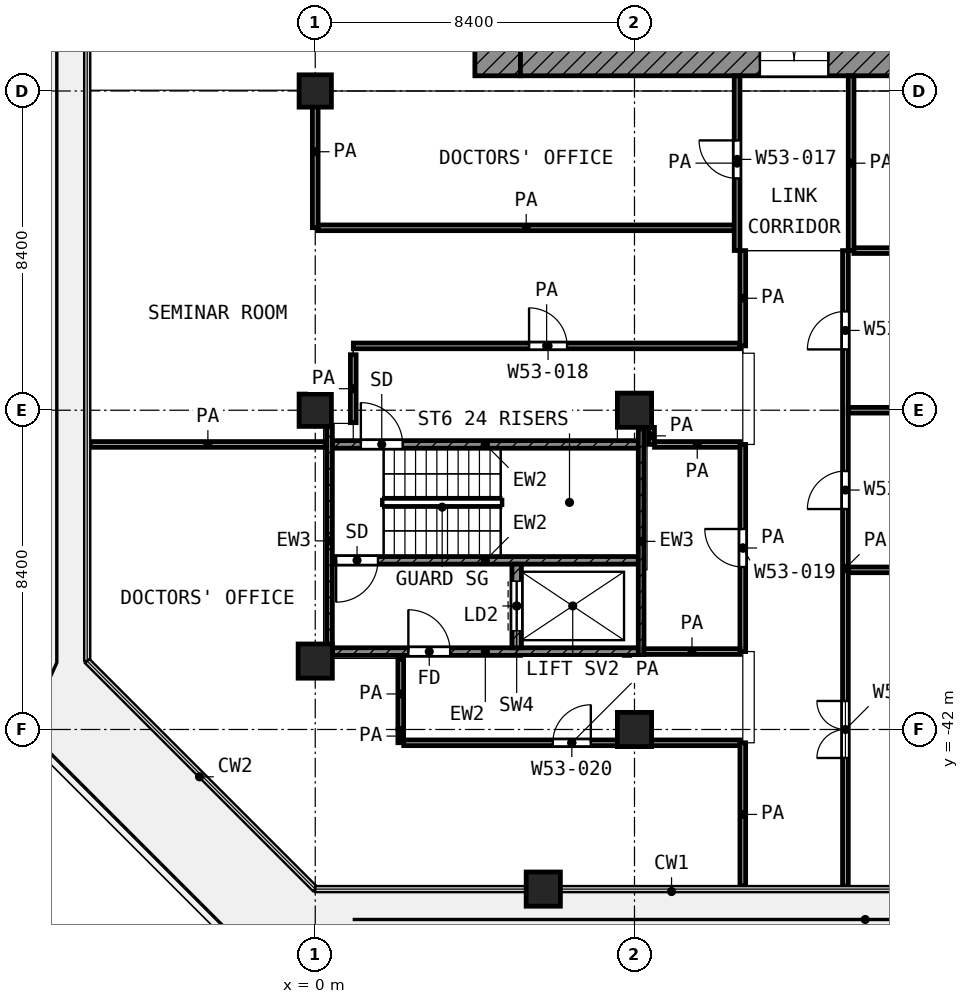
"""IFC4 building model, lengths in metres.
Left out: names, types, materials, properties, quantities, classifications, styles, units other than length and angle.
Written with IfcOpenShell. Run it as: python <this file> out.ifc"""

import sys

from ifc_helpers import new_model, si_unit, direction, frame, frame_2d, origin, origin_2d, place, context, subcontext, project, spatial, rectangle, extrude, element, fill, save


model = new_model("IFC4")
c1 = context("Model", 3, precision=1e-05, world=origin(), true_north=direction((0.0, 1.0)))
c2 = subcontext(c1, "Body", "Model", "MODEL_VIEW")
j1 = project(units=[si_unit("LENGTHUNIT", "METRE"), si_unit("PLANEANGLEUNIT", "RADIAN")], contexts=[c1])
p1 = place(None, origin())
s1 = spatial("IfcSite", under=j1, at=p1, CompositionType="ELEMENT")
p2 = place(p1, origin())
s2 = spatial("IfcBuilding", under=s1, at=p2, CompositionType="ELEMENT")
p3 = place(p2, frame((0.0, 0.0, 230.6)))
s3 = spatial("IfcBuildingStorey", under=s2, at=p3, CompositionType="ELEMENT", Elevation=230.6)
for number, where, z_axis, x_axis in (
    (1, (0.0, -25.2, 0.0), (0.0, 0.0, 1.0), (1.0, 0.0, 0.0)),
    (2, (0.0, -33.6, 0.0), (0.0, 0.0, 1.0), (1.0, 0.0, 0.0)),
):
    element("IfcColumn", number, at=place(p3, frame(where, z_axis=z_axis, x_axis=x_axis)), inside=s3, PredefinedType="COLUMN", context=c2, shape_type="SweptSolid", body=[
        extrude(rectangle(XDim=0.85, YDim=0.85, at=origin_2d()), origin(), (0.0, 0.0, 1.0), 4.2),
    ])
for number, where, z_axis, x_axis in (
    (3, (8.4, -33.6, 0.0), (0.0, 0.0, 1.0), (1.0, 0.0, 0.0)),
    (4, (0.0, -40.2, 0.0), (0.0, 0.0, 1.0), (1.0, 0.0, 0.0)),
    (5, (8.4, -42.0, 0.0), (0.0, 0.0, 1.0), (1.0, 0.0, 0.0)),
    (6, (6.0, -46.2, 0.0), (0.0, 0.0, 1.0), (1.0, 0.0, 0.0)),
):
    element("IfcColumn", number, at=place(p3, frame(where, z_axis=z_axis, x_axis=x_axis)), inside=s3, PredefinedType="COLUMN", context=c2, shape_type="SweptSolid", body=[
        extrude(rectangle(XDim=0.9, YDim=0.9, at=origin_2d()), origin(), (0.0, 0.0, 1.0), 4.2),
    ])
p4 = place(p3, frame((4.8, -24.8, 0.0), z_axis=(0.0, 0.0, 1.0), x_axis=(0.0, 1.0, 0.0)))
e7 = element("IfcWall", 7, at=p4, inside=s3, PredefinedType="SHEAR", context=c2, shape_type="SweptSolid", body=[
    extrude(rectangle(XDim=19.4, YDim=1.2, at=frame_2d((9.7, 0.0))), origin(), (0.0, 0.0, 1.0), 3.6),
])
p5 = place(p4, frame((11.25, 0.0, 0.0)))
e8 = element("IfcOpeningElement", 8, at=p5, cuts=e7, PredefinedType="OPENING", context=c2, shape_type="SweptSolid", body=[
    extrude(rectangle(XDim=1.1, YDim=2.1, at=frame_2d((0.55, 1.05))), frame((0.0, 0.61, 0.0), z_axis=(0.0, -1.0, 0.0), x_axis=(1.0, 0.0, 0.0)), (0.0, 0.0, 1.0), 1.22),
])
p6 = place(p4, frame((1.95, 0.0, 0.0)))
e9 = element("IfcOpeningElement", 9, at=p6, cuts=e7, PredefinedType="OPENING", context=c2, shape_type="SweptSolid", body=[
    extrude(rectangle(XDim=1.1, YDim=2.1, at=frame_2d((0.55, 1.05))), frame((0.0, 0.61, 0.0), z_axis=(0.0, -1.0, 0.0), x_axis=(1.0, 0.0, 0.0)), (0.0, 0.0, 1.0), 1.22),
])
p7 = place(p3, frame((5.4, -24.4, 0.0), z_axis=(0.0, 0.0, 1.0), x_axis=(1.0, 0.0, 0.0)))
e10 = element("IfcWall", 10, at=p7, inside=s3, PredefinedType="SHEAR", context=c2, shape_type="SweptSolid", body=[
    extrude(rectangle(XDim=18.6, YDim=0.8, at=frame_2d((9.3, 0.0))), origin(), (0.0, 0.0, 1.0), 3.6),
])
p8 = place(p7, frame((6.3, 0.0, 0.0)))
e11 = element("IfcOpeningElement", 11, at=p8, cuts=e10, PredefinedType="OPENING", context=c2, shape_type="SweptSolid", body=[
    extrude(rectangle(XDim=1.8, YDim=2.1, at=frame_2d((0.9, 1.05))), frame((0.0, 0.41, 0.0), z_axis=(0.0, -1.0, 0.0), x_axis=(1.0, 0.0, 0.0)), (0.0, 0.0, 1.0), 0.82),
])
p9 = place(p3, frame((0.375, -40.05, 0.0), z_axis=(0.0, 0.0, 1.0), x_axis=(0.0, 1.0, 0.0)))
e12 = element("IfcWall", 12, at=p9, inside=s3, PredefinedType="SHEAR", context=c2, shape_type="SweptSolid", body=[
    extrude(rectangle(XDim=6.025, YDim=0.15, at=frame_2d((3.013, 0.0))), origin(), (0.0, 0.0, 1.0), 3.6),
])
p10 = place(p3, frame((8.575, -40.05, 0.0), z_axis=(0.0, 0.0, 1.0), x_axis=(0.0, 1.0, 0.0)))
e13 = element("IfcWall", 13, at=p10, inside=s3, PredefinedType="SHEAR", context=c2, shape_type="SweptSolid", body=[
    extrude(rectangle(XDim=6.0, YDim=0.15, at=frame_2d((3.0, 0.0))), origin(), (0.0, 0.0, 1.0), 3.6),
])
p11 = place(p3, frame((0.45, -34.5, 0.0), z_axis=(0.0, 0.0, 1.0), x_axis=(1.0, 0.0, 0.0)))
e14 = element("IfcWall", 14, at=p11, inside=s3, PredefinedType="SHEAR", context=c2, shape_type="SweptSolid", body=[
    extrude(rectangle(XDim=8.05, YDim=0.2, at=frame_2d((4.025, 0.0))), origin(), (0.0, 0.0, 1.0), 3.6),
])
p12 = place(p11, frame((0.75, 0.0, 0.0)))
e15 = element("IfcOpeningElement", 15, at=p12, cuts=e14, PredefinedType="OPENING", context=c2, shape_type="SweptSolid", body=[
    extrude(rectangle(XDim=1.1, YDim=2.1, at=frame_2d((0.55, 1.05))), frame((0.0, 0.11, 0.0), z_axis=(0.0, -1.0, 0.0), x_axis=(1.0, 0.0, 0.0)), (0.0, 0.0, 1.0), 0.22),
])
p13 = place(p3, frame((0.45, -37.55, 0.0), z_axis=(0.0, 0.0, 1.0), x_axis=(1.0, 0.0, 0.0)))
e16 = element("IfcWall", 16, at=p13, inside=s3, PredefinedType="SHEAR", context=c2, shape_type="SweptSolid", body=[
    extrude(rectangle(XDim=8.05, YDim=0.2, at=frame_2d((4.025, 0.0))), origin(), (0.0, 0.0, 1.0), 3.6),
])
p14 = place(p13, frame((0.1, 0.0, 0.0)))
e17 = element("IfcOpeningElement", 17, at=p14, cuts=e16, PredefinedType="OPENING", context=c2, shape_type="SweptSolid", body=[
    extrude(rectangle(XDim=1.1, YDim=2.1, at=frame_2d((0.55, 1.05))), frame((0.0, 0.11, 0.0), z_axis=(0.0, -1.0, 0.0), x_axis=(1.0, 0.0, 0.0)), (0.0, 0.0, 1.0), 0.22),
])
p15 = place(p3, frame((0.45, -39.95, 0.0), z_axis=(0.0, 0.0, 1.0), x_axis=(1.0, 0.0, 0.0)))
e18 = element("IfcWall", 18, at=p15, inside=s3, PredefinedType="SHEAR", context=c2, shape_type="SweptSolid", body=[
    extrude(rectangle(XDim=8.05, YDim=0.2, at=frame_2d((4.025, 0.0))), origin(), (0.0, 0.0, 1.0), 3.6),
])
p16 = place(p15, frame((2.0, 0.0, 0.0)))
e19 = element("IfcOpeningElement", 19, at=p16, cuts=e18, PredefinedType="OPENING", context=c2, shape_type="SweptSolid", body=[
    extrude(rectangle(XDim=1.1, YDim=2.1, at=frame_2d((0.55, 1.05))), frame((0.0, 0.11, 0.0), z_axis=(0.0, -1.0, 0.0), x_axis=(1.0, 0.0, 0.0)), (0.0, 0.0, 1.0), 0.22),
])
p17 = place(p3, frame((5.3, -39.85, 0.0), z_axis=(0.0, 0.0, 1.0), x_axis=(0.0, 1.0, 0.0)))
e20 = element("IfcWall", 20, at=p17, inside=s3, PredefinedType="SHEAR", context=c2, shape_type="SweptSolid", body=[
    extrude(rectangle(XDim=2.2, YDim=0.25, at=frame_2d((1.1, 0.0))), origin(), (0.0, 0.0, 1.0), 3.6),
])
p18 = place(p17, frame((0.45, 0.0, 0.0)))
e21 = element("IfcOpeningElement", 21, at=p18, cuts=e20, PredefinedType="OPENING", context=c2, shape_type="SweptSolid", body=[
    extrude(rectangle(XDim=1.3, YDim=2.1, at=frame_2d((0.65, 1.05))), frame((0.0, 0.135, 0.0), z_axis=(0.0, -1.0, 0.0), x_axis=(1.0, 0.0, 0.0)), (0.0, 0.0, 1.0), 0.27),
])
p19 = place(p3, frame((2.327, -42.35, 0.0), z_axis=(0.0, 0.0, 1.0), x_axis=(1.0, 0.0, 0.0)))
e22 = element("IfcWall", 22, at=p19, inside=s3, PredefinedType="PARTITIONING", context=c2, shape_type="SweptSolid", body=[
    extrude(rectangle(XDim=8.848, YDim=0.15, at=frame_2d((4.424, 0.0))), origin(), (0.0, 0.0, 1.0), 3.6),
])
p20 = place(p19, frame((3.924, 0.0, 0.0)))
e23 = element("IfcOpeningElement", 23, at=p20, cuts=e22, PredefinedType="OPENING", context=c2, shape_type="SweptSolid", body=[
    extrude(rectangle(XDim=1.0, YDim=2.1, at=frame_2d((0.5, 1.05))), frame((0.0, 0.085, 0.0), z_axis=(0.0, -1.0, 0.0), x_axis=(1.0, 0.0, 0.0)), (0.0, 0.0, 1.0), 0.17),
])
p21 = place(p3, frame((8.65, -39.95, 0.0), z_axis=(0.0, 0.0, 1.0), x_axis=(1.0, 0.0, 0.0)))
e24 = element("IfcWall", 24, at=p21, inside=s3, PredefinedType="PARTITIONING", context=c2, shape_type="SweptSolid", body=[
    extrude(rectangle(XDim=2.525, YDim=0.15, at=frame_2d((1.263, 0.0))), origin(), (0.0, 0.0, 1.0), 3.6),
])
p22 = place(p3, frame((14.025, -37.8, 0.0), z_axis=(0.0, 0.0, 1.0), x_axis=(1.0, 0.0, 0.0)))
e25 = element("IfcWall", 25, at=p22, inside=s3, PredefinedType="PARTITIONING", context=c2, shape_type="SweptSolid", body=[
    extrude(rectangle(XDim=11.095, YDim=0.15, at=frame_2d((5.548, 0.0))), origin(), (0.0, 0.0, 1.0), 2.7),
])
p23 = place(p3, frame((-5.92, -34.5, 0.0), z_axis=(0.0, 0.0, 1.0), x_axis=(1.0, 0.0, 0.0)))
e26 = element("IfcWall", 26, at=p23, inside=s3, PredefinedType="PARTITIONING", context=c2, shape_type="SweptSolid", body=[
    extrude(rectangle(XDim=6.19, YDim=0.15, at=frame_2d((3.095, 0.0))), origin(), (0.0, 0.0, 1.0), 3.6),
])
p24 = place(p3, frame((8.927, -34.5, 0.0), z_axis=(0.0, 0.0, 1.0), x_axis=(1.0, 0.0, 0.0)))
e27 = element("IfcWall", 27, at=p24, inside=s3, PredefinedType="PARTITIONING", context=c2, shape_type="SweptSolid", body=[
    extrude(rectangle(XDim=2.248, YDim=0.15, at=frame_2d((1.124, 0.0))), origin(), (0.0, 0.0, 1.0), 3.6),
])
p25 = place(p3, frame((14.025, -33.6, 0.0), z_axis=(0.0, 0.0, 1.0), x_axis=(1.0, 0.0, 0.0)))
e28 = element("IfcWall", 28, at=p25, inside=s3, PredefinedType="PARTITIONING", context=c2, shape_type="SweptSolid", body=[
    extrude(rectangle(XDim=11.095, YDim=0.15, at=frame_2d((5.548, 0.0))), origin(), (0.0, 0.0, 1.0), 2.7),
])
p26 = place(p3, frame((1.002, -31.907, 0.0), z_axis=(0.0, 0.0, 1.0), x_axis=(1.0, 0.0, 0.0)))
e29 = element("IfcWall", 29, at=p26, inside=s3, PredefinedType="PARTITIONING", context=c2, shape_type="SweptSolid", body=[
    extrude(rectangle(XDim=10.173, YDim=0.15, at=frame_2d((5.086, 0.0))), origin(), (0.0, 0.0, 1.0), 3.6),
])
p27 = place(p26, frame((4.624, 0.0, 0.0)))
e30 = element("IfcOpeningElement", 30, at=p27, cuts=e29, PredefinedType="OPENING", context=c2, shape_type="SweptSolid", body=[
    extrude(rectangle(XDim=1.0, YDim=2.1, at=frame_2d((0.5, 1.05))), frame((0.0, 0.085, 0.0), z_axis=(0.0, -1.0, 0.0), x_axis=(1.0, 0.0, 0.0)), (0.0, 0.0, 1.0), 0.17),
])
p28 = place(p3, frame((14.175, -29.4, 0.0), z_axis=(0.0, 0.0, 1.0), x_axis=(1.0, 0.0, 0.0)))
e31 = element("IfcWall", 31, at=p28, inside=s3, PredefinedType="PARTITIONING", context=c2, shape_type="SweptSolid", body=[
    extrude(rectangle(XDim=10.95, YDim=0.15, at=frame_2d((5.475, 0.0))), origin(), (0.0, 0.0, 1.0), 3.6),
])
p29 = place(p3, frame((0.077, -28.8, 0.0), z_axis=(0.0, 0.0, 1.0), x_axis=(1.0, 0.0, 0.0)))
e32 = element("IfcWall", 32, at=p29, inside=s3, PredefinedType="PARTITIONING", context=c2, shape_type="SweptSolid", body=[
    extrude(rectangle(XDim=10.948, YDim=0.15, at=frame_2d((5.474, 0.0))), origin(), (0.0, 0.0, 1.0), 3.6),
])
p30 = place(p3, frame((0.0, -28.797, 0.0), z_axis=(0.0, 0.0, 1.0), x_axis=(0.0, 1.0, 0.0)))
e33 = element("IfcWall", 33, at=p30, inside=s3, PredefinedType="PARTITIONING", context=c2, shape_type="SweptSolid", body=[
    extrude(rectangle(XDim=3.997, YDim=0.15, at=frame_2d((1.999, 0.0))), origin(), (0.0, 0.0, 1.0), 3.6),
])
p31 = place(p3, frame((1.0, -33.927, 0.0), z_axis=(0.0, 0.0, 1.0), x_axis=(0.0, 1.0, 0.0)))
e34 = element("IfcWall", 34, at=p31, inside=s3, PredefinedType="PARTITIONING", context=c2, shape_type="SweptSolid", body=[
    extrude(rectangle(XDim=1.787, YDim=0.15, at=frame_2d((0.894, 0.0))), origin(), (0.0, 0.0, 1.0), 3.6),
])
p32 = place(p3, frame((2.25, -42.348, 0.0), z_axis=(0.0, 0.0, 1.0), x_axis=(0.0, 1.0, 0.0)))
e35 = element("IfcWall", 35, at=p32, inside=s3, PredefinedType="PARTITIONING", context=c2, shape_type="SweptSolid", body=[
    extrude(rectangle(XDim=0.348, YDim=0.15, at=frame_2d((0.174, 0.0))), origin(), (0.0, 0.0, 1.0), 3.6),
])
p33 = place(p3, frame((2.25, -41.98, 0.0), z_axis=(0.0, 0.0, 1.0), x_axis=(0.0, 1.0, 0.0)))
e36 = element("IfcWall", 36, at=p33, inside=s3, PredefinedType="PARTITIONING", context=c2, shape_type="SweptSolid", body=[
    extrude(rectangle(XDim=1.83, YDim=0.15, at=frame_2d((0.915, 0.0))), origin(), (0.0, 0.0, 1.0), 3.6),
])
p34 = place(p3, frame((8.85, -34.498, 0.0), z_axis=(0.0, 0.0, 1.0), x_axis=(0.0, 1.0, 0.0)))
e37 = element("IfcWall", 37, at=p34, inside=s3, PredefinedType="PARTITIONING", context=c2, shape_type="SweptSolid", body=[
    extrude(rectangle(XDim=0.447, YDim=0.15, at=frame_2d((0.224, 0.0))), origin(), (0.0, 0.0, 1.0), 3.6),
])
p35 = place(p3, frame((11.1, -29.397, 0.0), z_axis=(0.0, 0.0, 1.0), x_axis=(0.0, 1.0, 0.0)))
e38 = element("IfcWall", 38, at=p35, inside=s3, PredefinedType="PARTITIONING", context=c2, shape_type="SweptSolid", body=[
    extrude(rectangle(XDim=4.597, YDim=0.15, at=frame_2d((2.298, 0.0))), origin(), (0.0, 0.0, 1.0), 3.6),
])
p36 = place(p35, frame((1.897, 0.0, 0.0)))
e39 = element("IfcOpeningElement", 39, at=p36, cuts=e38, PredefinedType="OPENING", context=c2, shape_type="SweptSolid", body=[
    extrude(rectangle(XDim=1.0, YDim=2.1, at=frame_2d((0.5, 1.05))), frame((0.0, 0.085, 0.0), z_axis=(0.0, -1.0, 0.0), x_axis=(1.0, 0.0, 0.0)), (0.0, 0.0, 1.0), 0.17),
])
p37 = place(p3, frame((11.25, -46.12, 0.0), z_axis=(0.0, 0.0, 1.0), x_axis=(0.0, 1.0, 0.0)))
e40 = element("IfcWall", 40, at=p37, inside=s3, PredefinedType="PARTITIONING", context=c2, shape_type="SweptSolid", body=[
    extrude(rectangle(XDim=3.77, YDim=0.15, at=frame_2d((1.885, 0.0))), origin(), (0.0, 0.0, 1.0), 3.6),
])
p38 = place(p3, frame((11.25, -39.95, 0.0), z_axis=(0.0, 0.0, 1.0), x_axis=(0.0, 1.0, 0.0)))
e41 = element("IfcWall", 41, at=p38, inside=s3, PredefinedType="PARTITIONING", context=c2, shape_type="SweptSolid", body=[
    extrude(rectangle(XDim=5.45, YDim=0.15, at=frame_2d((2.725, 0.0))), origin(), (0.0, 0.0, 1.0), 3.6),
])
p39 = place(p38, frame((2.225, 0.0, 0.0)))
e42 = element("IfcOpeningElement", 42, at=p39, cuts=e41, PredefinedType="OPENING", context=c2, shape_type="SweptSolid", body=[
    extrude(rectangle(XDim=1.0, YDim=2.1, at=frame_2d((0.5, 1.05))), frame((0.0, 0.085, 0.0), z_axis=(0.0, -1.0, 0.0), x_axis=(1.0, 0.0, 0.0)), (0.0, 0.0, 1.0), 0.17),
])
p40 = place(p3, frame((11.25, -31.907, 0.0), z_axis=(0.0, 0.0, 1.0), x_axis=(0.0, 1.0, 0.0)))
e43 = element("IfcWall", 43, at=p40, inside=s3, PredefinedType="PARTITIONING", context=c2, shape_type="SweptSolid", body=[
    extrude(rectangle(XDim=2.507, YDim=0.15, at=frame_2d((1.253, 0.0))), origin(), (0.0, 0.0, 1.0), 3.6),
])
p41 = place(p3, frame((13.95, -46.12, 0.0), z_axis=(0.0, 0.0, 1.0), x_axis=(0.0, 1.0, 0.0)))
e44 = element("IfcWall", 44, at=p41, inside=s3, PredefinedType="PARTITIONING", context=c2, shape_type="SweptSolid", body=[
    extrude(rectangle(XDim=16.72, YDim=0.15, at=frame_2d((8.36, 0.0))), origin(), (0.0, 0.0, 1.0), 3.6),
])
p42 = place(p41, frame((14.12, 0.0, 0.0)))
e45 = element("IfcOpeningElement", 45, at=p42, cuts=e44, PredefinedType="OPENING", context=c2, shape_type="SweptSolid", body=[
    extrude(rectangle(XDim=1.0, YDim=2.1, at=frame_2d((0.5, 1.05))), frame((0.0, 0.085, 0.0), z_axis=(0.0, -1.0, 0.0), x_axis=(1.0, 0.0, 0.0)), (0.0, 0.0, 1.0), 0.17),
])
p43 = place(p41, frame((9.92, 0.0, 0.0)))
e46 = element("IfcOpeningElement", 46, at=p43, cuts=e44, PredefinedType="OPENING", context=c2, shape_type="SweptSolid", body=[
    extrude(rectangle(XDim=1.0, YDim=2.1, at=frame_2d((0.5, 1.05))), frame((0.0, 0.085, 0.0), z_axis=(0.0, -1.0, 0.0), x_axis=(1.0, 0.0, 0.0)), (0.0, 0.0, 1.0), 0.17),
])
p44 = place(p41, frame((3.37, 0.0, 0.0)))
e47 = element("IfcOpeningElement", 47, at=p44, cuts=e44, PredefinedType="OPENING", context=c2, shape_type="SweptSolid", body=[
    extrude(rectangle(XDim=1.5, YDim=2.1, at=frame_2d((0.75, 1.05))), frame((0.0, 0.085, 0.0), z_axis=(0.0, -1.0, 0.0), x_axis=(1.0, 0.0, 0.0)), (0.0, 0.0, 1.0), 0.17),
])
p45 = place(p3, frame((14.1, -29.4, 0.0), z_axis=(0.0, 0.0, 1.0), x_axis=(0.0, 1.0, 0.0)))
e48 = element("IfcWall", 48, at=p45, inside=s3, PredefinedType="PARTITIONING", context=c2, shape_type="SweptSolid", body=[
    extrude(rectangle(XDim=4.6, YDim=0.15, at=frame_2d((2.3, 0.0))), origin(), (0.0, 0.0, 1.0), 3.6),
])
p46 = place(p8, origin())
e49 = element("IfcDoor", 49, at=p46, inside=s3, OperationType="DOUBLE_DOOR_SINGLE_SWING", PredefinedType="DOOR", context=c2, shape_type="SweptSolid", body=[
    extrude(rectangle(XDim=1.8, YDim=2.1, at=frame_2d((0.9, 1.05))), frame((0.0, 0.025, 0.0), z_axis=(0.0, -1.0, 0.0), x_axis=(1.0, 0.0, 0.0)), (0.0, 0.0, 1.0), 0.05),
])
fill(e11, e49)
p47 = place(p12, origin())
e50 = element("IfcDoor", 50, at=p47, inside=s3, OperationType="SINGLE_SWING_LEFT", PredefinedType="DOOR", context=c2, shape_type="SweptSolid", body=[
    extrude(rectangle(XDim=1.1, YDim=2.1, at=frame_2d((0.55, 1.05))), frame((0.0, 0.025, 0.0), z_axis=(0.0, -1.0, 0.0), x_axis=(1.0, 0.0, 0.0)), (0.0, 0.0, 1.0), 0.05),
])
fill(e15, e50)
p48 = place(p14, frame((1.1, 0.0, 0.0), z_axis=(0.0, 0.0, 1.0), x_axis=(-1.0, 0.0, 0.0)))
e51 = element("IfcDoor", 51, at=p48, inside=s3, OperationType="SINGLE_SWING_LEFT", PredefinedType="DOOR", context=c2, shape_type="SweptSolid", body=[
    extrude(rectangle(XDim=1.1, YDim=2.1, at=frame_2d((0.55, 1.05))), frame((0.0, 0.025, 0.0), z_axis=(0.0, -1.0, 0.0), x_axis=(1.0, 0.0, 0.0)), (0.0, 0.0, 1.0), 0.05),
])
fill(e17, e51)
p49 = place(p18, origin())
e52 = element("IfcDoor", 52, at=p49, inside=s3, OperationType="DOUBLE_DOOR_SLIDING", PredefinedType="DOOR", context=c2, shape_type="SweptSolid", body=[
    extrude(rectangle(XDim=1.3, YDim=2.1, at=frame_2d((0.65, 1.05))), frame((0.0, 0.025, 0.0), z_axis=(0.0, -1.0, 0.0), x_axis=(1.0, 0.0, 0.0)), (0.0, 0.0, 1.0), 0.05),
])
fill(e21, e52)
p50 = place(p16, origin())
e53 = element("IfcDoor", 53, at=p50, inside=s3, OperationType="SINGLE_SWING_LEFT", PredefinedType="DOOR", context=c2, shape_type="SweptSolid", body=[
    extrude(rectangle(XDim=1.1, YDim=2.1, at=frame_2d((0.55, 1.05))), frame((0.0, 0.025, 0.0), z_axis=(0.0, -1.0, 0.0), x_axis=(1.0, 0.0, 0.0)), (0.0, 0.0, 1.0), 0.05),
])
fill(e19, e53)
p51 = place(p36, origin())
e54 = element("IfcDoor", 54, at=p51, inside=s3, OperationType="SINGLE_SWING_RIGHT", PredefinedType="DOOR", context=c2, shape_type="SweptSolid", body=[
    extrude(rectangle(XDim=1.0, YDim=2.1, at=frame_2d((0.5, 1.05))), frame((0.0, 0.025, 0.0), z_axis=(0.0, -1.0, 0.0), x_axis=(1.0, 0.0, 0.0)), (0.0, 0.0, 1.0), 0.05),
])
fill(e39, e54)
p52 = place(p27, origin())
e55 = element("IfcDoor", 55, at=p52, inside=s3, OperationType="SINGLE_SWING_LEFT", PredefinedType="DOOR", context=c2, shape_type="SweptSolid", body=[
    extrude(rectangle(XDim=1.0, YDim=2.1, at=frame_2d((0.5, 1.05))), frame((0.0, 0.025, 0.0), z_axis=(0.0, -1.0, 0.0), x_axis=(1.0, 0.0, 0.0)), (0.0, 0.0, 1.0), 0.05),
])
fill(e30, e55)
p53 = place(p39, origin())
e56 = element("IfcDoor", 56, at=p53, inside=s3, OperationType="SINGLE_SWING_RIGHT", PredefinedType="DOOR", context=c2, shape_type="SweptSolid", body=[
    extrude(rectangle(XDim=1.0, YDim=2.1, at=frame_2d((0.5, 1.05))), frame((0.0, 0.025, 0.0), z_axis=(0.0, -1.0, 0.0), x_axis=(1.0, 0.0, 0.0)), (0.0, 0.0, 1.0), 0.05),
])
fill(e42, e56)
p54 = place(p20, origin())
e57 = element("IfcDoor", 57, at=p54, inside=s3, OperationType="SINGLE_SWING_RIGHT", PredefinedType="DOOR", context=c2, shape_type="SweptSolid", body=[
    extrude(rectangle(XDim=1.0, YDim=2.1, at=frame_2d((0.5, 1.05))), frame((0.0, 0.025, 0.0), z_axis=(0.0, -1.0, 0.0), x_axis=(1.0, 0.0, 0.0)), (0.0, 0.0, 1.0), 0.05),
])
fill(e23, e57)
p55 = place(p42, origin())
e58 = element("IfcDoor", 58, at=p55, inside=s3, OperationType="SINGLE_SWING_LEFT", PredefinedType="DOOR", context=c2, shape_type="SweptSolid", body=[
    extrude(rectangle(XDim=1.0, YDim=2.1, at=frame_2d((0.5, 1.05))), frame((0.0, 0.025, 0.0), z_axis=(0.0, -1.0, 0.0), x_axis=(1.0, 0.0, 0.0)), (0.0, 0.0, 1.0), 0.05),
])
fill(e45, e58)
p56 = place(p43, origin())
e59 = element("IfcDoor", 59, at=p56, inside=s3, OperationType="SINGLE_SWING_LEFT", PredefinedType="DOOR", context=c2, shape_type="SweptSolid", body=[
    extrude(rectangle(XDim=1.0, YDim=2.1, at=frame_2d((0.5, 1.05))), frame((0.0, 0.025, 0.0), z_axis=(0.0, -1.0, 0.0), x_axis=(1.0, 0.0, 0.0)), (0.0, 0.0, 1.0), 0.05),
])
fill(e46, e59)
p57 = place(p44, origin())
e60 = element("IfcDoor", 60, at=p57, inside=s3, OperationType="DOUBLE_DOOR_SINGLE_SWING", PredefinedType="DOOR", context=c2, shape_type="SweptSolid", body=[
    extrude(rectangle(XDim=1.5, YDim=2.1, at=frame_2d((0.75, 1.05))), frame((0.0, 0.025, 0.0), z_axis=(0.0, -1.0, 0.0), x_axis=(1.0, 0.0, 0.0)), (0.0, 0.0, 1.0), 0.05),
])
fill(e47, e60)
save(model, sys.argv[1])
